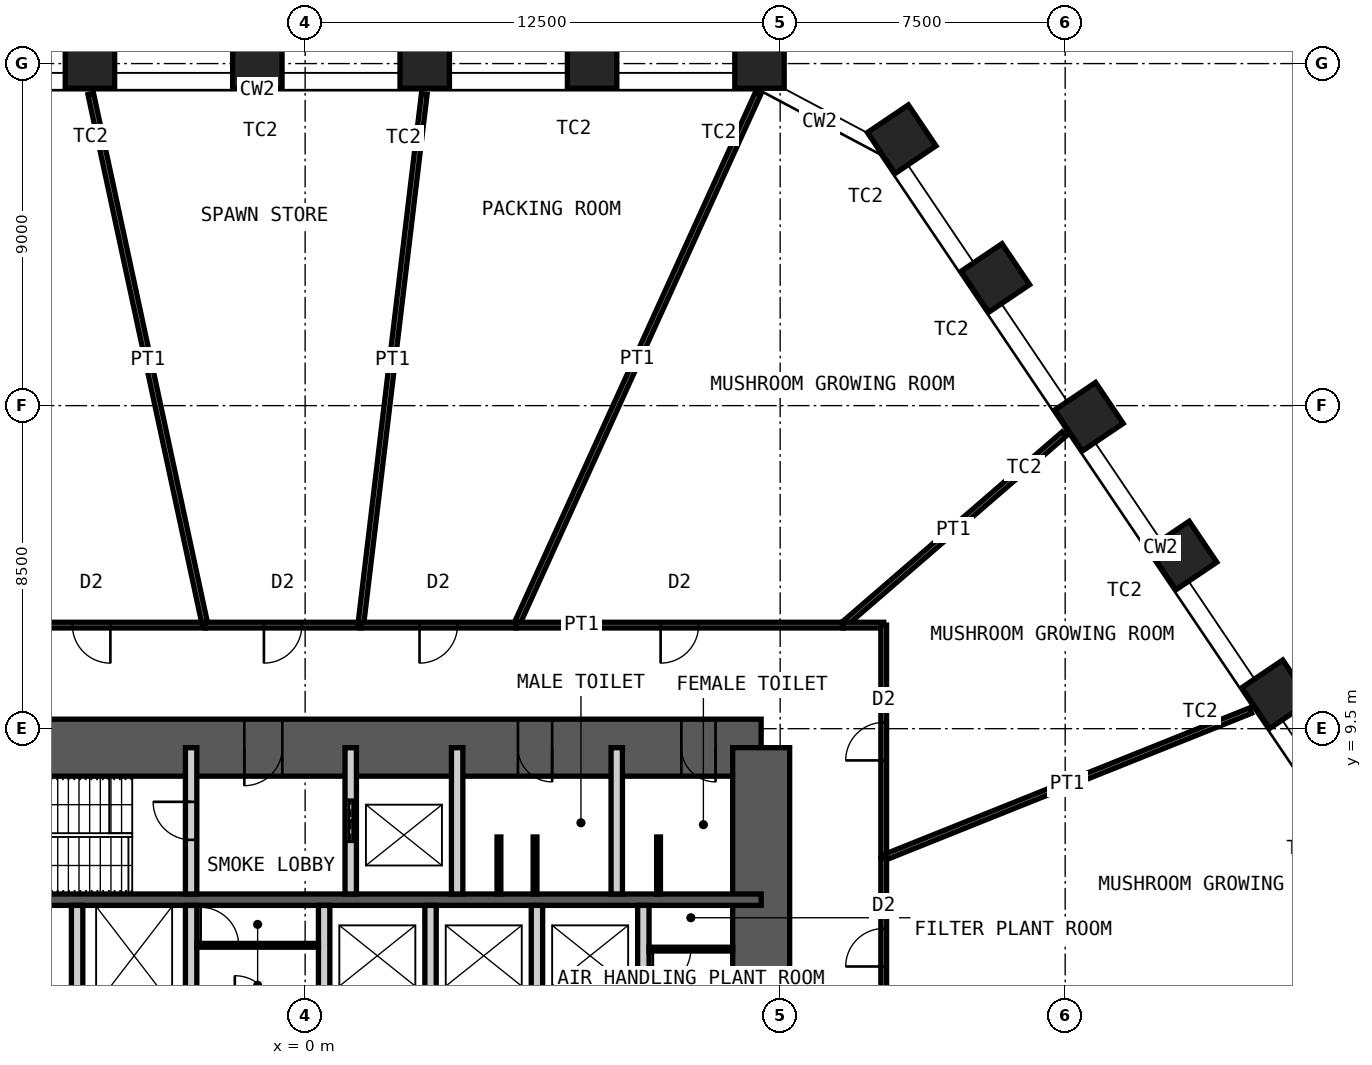
"""IFC4 building model, lengths in metres.
Left out: names, types, materials, properties, quantities, classifications, styles, units other than length and angle.
Written with IfcOpenShell. Run it as: python <this file> out.ifc"""

import sys

from ifc_helpers import new_model, si_unit, direction, frame, frame_2d, origin, origin_2d, place, context, subcontext, project, spatial, rectangle, hollow_rectangle, extrude, element, fill, save


model = new_model("IFC4")
c1 = context("Model", 3, precision=1e-05, world=origin(), true_north=direction((0.0, 1.0)))
c2 = subcontext(c1, "Body", "Model", "MODEL_VIEW")
j1 = project(units=[si_unit("LENGTHUNIT", "METRE"), si_unit("PLANEANGLEUNIT", "RADIAN")], contexts=[c1])
p1 = place(None, origin())
s1 = spatial("IfcSite", under=j1, at=p1, CompositionType="ELEMENT")
p2 = place(p1, origin())
s2 = spatial("IfcBuilding", under=s1, at=p2, CompositionType="ELEMENT")
p3 = place(p2, frame((0.0, 0.0, 67.0)))
s3 = spatial("IfcBuildingStorey", under=s2, at=p3, CompositionType="ELEMENT", Elevation=67.0)
for number, where, z_axis, x_axis in (
    (1, (-5.662, 27.0, 0.0), (0.0, 0.0, 1.0), (-1.0, 0.0, 0.0)),
    (2, (-1.258, 27.0, 0.0), (0.0, 0.0, 1.0), (-1.0, 0.0, 0.0)),
    (3, (3.147, 27.0, 0.0), (0.0, 0.0, 1.0), (-1.0, 0.0, 0.0)),
    (4, (7.552, 27.0, 0.0), (0.0, 0.0, 1.0), (-1.0, 0.0, 0.0)),
    (5, (11.956, 27.0, 0.0), (0.0, 0.0, 1.0), (-1.0, 0.0, 0.0)),
    (6, (15.698, 25.01, 0.0), (0.0, 0.0, 1.0), (-0.559, 0.829, 0.0)),
    (7, (18.161, 21.359, 0.0), (0.0, 0.0, 1.0), (-0.559, 0.829, 0.0)),
    (8, (20.624, 17.707, 0.0), (0.0, 0.0, 1.0), (-0.559, 0.829, 0.0)),
    (9, (23.087, 14.056, 0.0), (0.0, 0.0, 1.0), (-0.559, 0.829, 0.0)),
    (10, (25.55, 10.404, 0.0), (0.0, 0.0, 1.0), (-0.559, 0.829, 0.0)),
):
    element("IfcColumn", number, at=place(p3, frame(where, z_axis=z_axis, x_axis=x_axis)), inside=s3, PredefinedType="COLUMN", context=c2, shape_type="SweptSolid", body=[
        extrude(hollow_rectangle(XDim=1.3, YDim=1.3, WallThickness=0.1, at=origin_2d()), origin(), (0.0, 0.0, 1.0), 5.0),
    ])
p4 = place(p3, frame((-12.0, 9.0, 0.0), z_axis=(0.0, 0.0, 1.0), x_axis=(1.0, 0.0, 0.0)))
e11 = element("IfcWall", 11, at=p4, inside=s3, PredefinedType="SHEAR", context=c2, shape_type="SweptSolid", body=[
    extrude(rectangle(XDim=24.0, YDim=1.5, at=frame_2d((12.0, 0.0))), origin(), (0.0, 0.0, 1.0), 5.0),
])
p5 = place(p4, frame((10.4, 0.0, 0.0)))
e12 = element("IfcOpeningElement", 12, at=p5, cuts=e11, PredefinedType="OPENING", context=c2, shape_type="SweptSolid", body=[
    extrude(rectangle(XDim=1.0, YDim=2.1, at=frame_2d((0.5, 1.05))), frame((0.0, 0.76, 0.0), z_axis=(0.0, -1.0, 0.0), x_axis=(1.0, 0.0, 0.0)), (0.0, 0.0, 1.0), 1.52),
])
p6 = place(p4, frame((17.6, 0.0, 0.0)))
e13 = element("IfcOpeningElement", 13, at=p6, cuts=e11, PredefinedType="OPENING", context=c2, shape_type="SweptSolid", body=[
    extrude(rectangle(XDim=0.9, YDim=2.1, at=frame_2d((0.45, 1.05))), frame((0.0, 0.76, 0.0), z_axis=(0.0, -1.0, 0.0), x_axis=(1.0, 0.0, 0.0)), (0.0, 0.0, 1.0), 1.52),
])
p7 = place(p4, frame((21.9, 0.0, 0.0)))
e14 = element("IfcOpeningElement", 14, at=p7, cuts=e11, PredefinedType="OPENING", context=c2, shape_type="SweptSolid", body=[
    extrude(rectangle(XDim=0.9, YDim=2.1, at=frame_2d((0.45, 1.05))), frame((0.0, 0.76, 0.0), z_axis=(0.0, -1.0, 0.0), x_axis=(1.0, 0.0, 0.0)), (0.0, 0.0, 1.0), 1.52),
])
p8 = place(p3, frame((12.0, -9.0, 0.0), z_axis=(0.0, 0.0, 1.0), x_axis=(0.0, 1.0, 0.0)))
e15 = element("IfcWall", 15, at=p8, inside=s3, PredefinedType="SHEAR", context=c2, shape_type="SweptSolid", body=[
    extrude(rectangle(XDim=18.0, YDim=1.5, at=frame_2d((9.0, 0.0))), origin(), (0.0, 0.0, 1.0), 5.0),
])
p9 = place(p8, frame((8.1, 0.0, 0.0)))
e16 = element("IfcOpeningElement", 16, at=p9, cuts=e15, PredefinedType="OPENING", context=c2, shape_type="SweptSolid", body=[
    extrude(rectangle(XDim=1.8, YDim=2.1, at=frame_2d((0.9, 1.05))), frame((0.0, 0.76, 0.0), z_axis=(0.0, -1.0, 0.0), x_axis=(1.0, 0.0, 0.0)), (0.0, 0.0, 1.0), 1.52),
])
p10 = place(p3, frame((-12.0, 5.0, 0.0), z_axis=(0.0, 0.0, 1.0), x_axis=(1.0, 0.0, 0.0)))
e17 = element("IfcWall", 17, at=p10, inside=s3, PredefinedType="SHEAR", context=c2, shape_type="SweptSolid", body=[
    extrude(rectangle(XDim=24.0, YDim=0.3, at=frame_2d((12.0, 0.0))), origin(), (0.0, 0.0, 1.0), 5.0),
])
p11 = place(p3, frame((-3.0, 5.15, 0.0), z_axis=(0.0, 0.0, 1.0), x_axis=(0.0, 1.0, 0.0)))
e18 = element("IfcWall", 18, at=p11, inside=s3, PredefinedType="PARTITIONING", context=c2, shape_type="SweptSolid", body=[
    extrude(rectangle(XDim=3.85, YDim=0.3, at=frame_2d((1.925, 0.0))), origin(), (0.0, 0.0, 1.0), 4.78),
])
p12 = place(p11, frame((1.425, 0.0, 0.0)))
e19 = element("IfcOpeningElement", 19, at=p12, cuts=e18, PredefinedType="OPENING", context=c2, shape_type="SweptSolid", body=[
    extrude(rectangle(XDim=1.0, YDim=2.1, at=frame_2d((0.5, 1.05))), frame((0.0, 0.16, 0.0), z_axis=(0.0, -1.0, 0.0), x_axis=(1.0, 0.0, 0.0)), (0.0, 0.0, 1.0), 0.32),
])
p13 = place(p3, frame((1.2, 5.15, 0.0), z_axis=(0.0, 0.0, 1.0), x_axis=(0.0, 1.0, 0.0)))
e20 = element("IfcWall", 20, at=p13, inside=s3, PredefinedType="PARTITIONING", context=c2, shape_type="SweptSolid", body=[
    extrude(rectangle(XDim=3.85, YDim=0.3, at=frame_2d((1.925, 0.0))), origin(), (0.0, 0.0, 1.0), 4.78),
])
p14 = place(p13, frame((1.375, 0.0, 0.0)))
e21 = element("IfcOpeningElement", 21, at=p14, cuts=e20, PredefinedType="OPENING", context=c2, shape_type="SweptSolid", body=[
    extrude(rectangle(XDim=1.1, YDim=2.4, at=frame_2d((0.55, 1.2))), frame((0.0, 0.16, 0.0), z_axis=(0.0, -1.0, 0.0), x_axis=(1.0, 0.0, 0.0)), (0.0, 0.0, 1.0), 0.32),
])
for number, where, z_axis, x_axis in (
    (22, (4.0, 5.15, 0.0), (0.0, 0.0, 1.0), (0.0, 1.0, 0.0)),
    (23, (8.2, 5.15, 0.0), (0.0, 0.0, 1.0), (0.0, 1.0, 0.0)),
):
    element("IfcWall", number, at=place(p3, frame(where, z_axis=z_axis, x_axis=x_axis)), inside=s3, PredefinedType="PARTITIONING", context=c2, shape_type="SweptSolid", body=[
        extrude(rectangle(XDim=3.85, YDim=0.3, at=frame_2d((1.925, 0.0))), origin(), (0.0, 0.0, 1.0), 4.78),
    ])
for number, where, z_axis, x_axis in (
    (24, (-6.0, 2.2, 0.0), (0.0, 0.0, 1.0), (0.0, 1.0, 0.0)),
    (25, (-3.0, 2.2, 0.0), (0.0, 0.0, 1.0), (0.0, 1.0, 0.0)),
    (26, (0.5, 2.2, 0.0), (0.0, 0.0, 1.0), (0.0, 1.0, 0.0)),
    (27, (3.3, 2.2, 0.0), (0.0, 0.0, 1.0), (0.0, 1.0, 0.0)),
    (28, (6.1, 2.2, 0.0), (0.0, 0.0, 1.0), (0.0, 1.0, 0.0)),
    (29, (8.9, 2.2, 0.0), (0.0, 0.0, 1.0), (0.0, 1.0, 0.0)),
):
    element("IfcWall", number, at=place(p3, frame(where, z_axis=z_axis, x_axis=x_axis)), inside=s3, PredefinedType="PARTITIONING", context=c2, shape_type="SweptSolid", body=[
        extrude(rectangle(XDim=2.65, YDim=0.3, at=frame_2d((1.325, 0.0))), origin(), (0.0, 0.0, 1.0), 4.78),
    ])
p15 = place(p3, frame((-2.85, 3.8, 0.0), z_axis=(0.0, 0.0, 1.0), x_axis=(1.0, 0.0, 0.0)))
e30 = element("IfcWall", 30, at=p15, inside=s3, PredefinedType="PARTITIONING", context=c2, shape_type="SweptSolid", body=[
    extrude(rectangle(XDim=3.2, YDim=0.1, at=frame_2d((1.6, 0.0))), origin(), (0.0, 0.0, 1.0), 4.78),
])
p16 = place(p15, frame((0.1, 0.0, 0.0)))
e31 = element("IfcOpeningElement", 31, at=p16, cuts=e30, PredefinedType="OPENING", context=c2, shape_type="SweptSolid", body=[
    extrude(rectangle(XDim=1.0, YDim=2.4, at=frame_2d((0.5, 1.2))), frame((0.0, 0.06, 0.0), z_axis=(0.0, -1.0, 0.0), x_axis=(1.0, 0.0, 0.0)), (0.0, 0.0, 1.0), 0.12),
])
p17 = place(p3, frame((9.05, 3.7, 0.0), z_axis=(0.0, 0.0, 1.0), x_axis=(1.0, 0.0, 0.0)))
e32 = element("IfcWall", 32, at=p17, inside=s3, PredefinedType="PARTITIONING", context=c2, shape_type="SweptSolid", body=[
    extrude(rectangle(XDim=2.2, YDim=0.1, at=frame_2d((1.1, 0.0))), origin(), (0.0, 0.0, 1.0), 4.78),
])
p18 = place(p17, frame((0.1, 0.0, 0.0)))
e33 = element("IfcOpeningElement", 33, at=p18, cuts=e32, PredefinedType="OPENING", context=c2, shape_type="SweptSolid", body=[
    extrude(rectangle(XDim=1.0, YDim=2.4, at=frame_2d((0.5, 1.2))), frame((0.0, 0.06, 0.0), z_axis=(0.0, -1.0, 0.0), x_axis=(1.0, 0.0, 0.0)), (0.0, 0.0, 1.0), 0.12),
])
for number, where, z_axis, x_axis in (
    (34, (5.1, 5.15, 0.0), (0.0, 0.0, 1.0), (0.0, 1.0, 0.0)),
    (35, (6.05, 5.15, 0.0), (0.0, 0.0, 1.0), (0.0, 1.0, 0.0)),
    (36, (9.3, 5.15, 0.0), (0.0, 0.0, 1.0), (0.0, 1.0, 0.0)),
):
    element("IfcWall", number, at=place(p3, frame(where, z_axis=z_axis, x_axis=x_axis)), inside=s3, PredefinedType="PARTITIONING", context=c2, shape_type="SweptSolid", body=[
        extrude(rectangle(XDim=1.5, YDim=0.1, at=frame_2d((0.75, 0.0))), origin(), (0.0, 0.0, 1.0), 2.1),
    ])
p19 = place(p3, frame((11.915, 26.209, 0.0), z_axis=(0.0, 0.0, 1.0), x_axis=(-0.413849644385, -0.910345248707, 0.0)))
e37 = element("IfcWall", 37, at=p19, inside=s3, PredefinedType="PARTITIONING", context=c2, shape_type="SweptSolid", body=[
    extrude(rectangle(XDim=15.361, YDim=0.15, at=frame_2d((7.681, 0.0))), origin(), (0.0, 0.0, 1.0), 3.7),
])
p20 = place(p3, frame((5.558, 12.225, 0.0), z_axis=(0.0, 0.0, 1.0), x_axis=(1.0, 0.0, 0.0)))
e38 = element("IfcWall", 38, at=p20, inside=s3, PredefinedType="PARTITIONING", context=c2, shape_type="SweptSolid", body=[
    extrude(rectangle(XDim=8.594, YDim=0.15, at=frame_2d((4.297, 0.0))), origin(), (0.0, 0.0, 1.0), 4.8),
])
p21 = place(p20, frame((3.797, 0.0, 0.0)))
e39 = element("IfcOpeningElement", 39, at=p21, cuts=e38, PredefinedType="OPENING", context=c2, shape_type="SweptSolid", body=[
    extrude(rectangle(XDim=1.0, YDim=2.4, at=frame_2d((0.5, 1.2))), frame((0.0, 0.085, 0.0), z_axis=(0.0, -1.0, 0.0), x_axis=(1.0, 0.0, 0.0)), (0.0, 0.0, 1.0), 0.17),
])
p22 = place(p3, frame((19.968, 17.25, 0.0), z_axis=(0.0, 0.0, 1.0), x_axis=(-0.756742305634, -0.653713303264, 0.0)))
e40 = element("IfcWall", 40, at=p22, inside=s3, PredefinedType="PARTITIONING", context=c2, shape_type="SweptSolid", body=[
    extrude(rectangle(XDim=7.687, YDim=0.15, at=frame_2d((3.844, 0.0))), origin(), (0.0, 0.0, 1.0), 3.7),
])
p23 = place(p3, frame((14.151, 12.225, 0.0), z_axis=(0.0, 0.0, 1.0), x_axis=(1.0, 0.0, 0.0)))
e41 = element("IfcWall", 41, at=p23, inside=s3, PredefinedType="PARTITIONING", context=c2, shape_type="SweptSolid", body=[
    extrude(rectangle(XDim=1.074, YDim=0.15, at=frame_2d((0.537, 0.0))), origin(), (0.0, 0.0, 1.0), 4.8),
])
p24 = place(p3, frame((15.225, 12.225, 0.0), z_axis=(0.0, 0.0, 1.0), x_axis=(0.0, -1.0, 0.0)))
e42 = element("IfcWall", 42, at=p24, inside=s3, PredefinedType="PARTITIONING", context=c2, shape_type="SweptSolid", body=[
    extrude(rectangle(XDim=6.12, YDim=0.15, at=frame_2d((3.06, 0.0))), origin(), (0.0, 0.0, 1.0), 4.8),
])
p25 = place(p24, frame((2.56, 0.0, 0.0)))
e43 = element("IfcOpeningElement", 43, at=p25, cuts=e42, PredefinedType="OPENING", context=c2, shape_type="SweptSolid", body=[
    extrude(rectangle(XDim=1.0, YDim=2.4, at=frame_2d((0.5, 1.2))), frame((0.0, 0.085, 0.0), z_axis=(0.0, -1.0, 0.0), x_axis=(1.0, 0.0, 0.0)), (0.0, 0.0, 1.0), 0.17),
])
p26 = place(p3, frame((24.877, 9.975, 0.0), z_axis=(0.0, 0.0, 1.0), x_axis=(-0.928160631083, -0.372179852904, 0.0)))
e44 = element("IfcWall", 44, at=p26, inside=s3, PredefinedType="PARTITIONING", context=c2, shape_type="SweptSolid", body=[
    extrude(rectangle(XDim=10.399, YDim=0.15, at=frame_2d((5.2, 0.0))), origin(), (0.0, 0.0, 1.0), 3.7),
])
p27 = place(p3, frame((15.225, 6.105, 0.0), z_axis=(0.0, 0.0, 1.0), x_axis=(0.0, -1.0, 0.0)))
e45 = element("IfcWall", 45, at=p27, inside=s3, PredefinedType="PARTITIONING", context=c2, shape_type="SweptSolid", body=[
    extrude(rectangle(XDim=4.725, YDim=0.15, at=frame_2d((2.363, 0.0))), origin(), (0.0, 0.0, 1.0), 4.8),
])
p28 = place(p27, frame((1.863, 0.0, 0.0)))
e46 = element("IfcOpeningElement", 46, at=p28, cuts=e45, PredefinedType="OPENING", context=c2, shape_type="SweptSolid", body=[
    extrude(rectangle(XDim=1.0, YDim=2.4, at=frame_2d((0.5, 1.2))), frame((0.0, 0.085, 0.0), z_axis=(0.0, -1.0, 0.0), x_axis=(1.0, 0.0, 0.0)), (0.0, 0.0, 1.0), 0.17),
])
p29 = place(p3, frame((29.796, 2.7, 0.0), z_axis=(0.0, 0.0, 1.0), x_axis=(-0.995918470907, -0.090257405823, 0.0)))
e47 = element("IfcWall", 47, at=p29, inside=s3, PredefinedType="PARTITIONING", context=c2, shape_type="SweptSolid", body=[
    extrude(rectangle(XDim=14.631, YDim=0.15, at=frame_2d((7.315, 0.0))), origin(), (0.0, 0.0, 1.0), 3.7),
])
p30 = place(p3, frame((-8.617, 12.225, 0.0), z_axis=(0.0, 0.0, 1.0), x_axis=(1.0, 0.0, 0.0)))
e48 = element("IfcWall", 48, at=p30, inside=s3, PredefinedType="PARTITIONING", context=c2, shape_type="SweptSolid", body=[
    extrude(rectangle(XDim=5.985, YDim=0.15, at=frame_2d((2.992, 0.0))), origin(), (0.0, 0.0, 1.0), 4.8),
])
p31 = place(p30, frame((2.492, 0.0, 0.0)))
e49 = element("IfcOpeningElement", 49, at=p31, cuts=e48, PredefinedType="OPENING", context=c2, shape_type="SweptSolid", body=[
    extrude(rectangle(XDim=1.0, YDim=2.4, at=frame_2d((0.5, 1.2))), frame((0.0, 0.085, 0.0), z_axis=(0.0, -1.0, 0.0), x_axis=(1.0, 0.0, 0.0)), (0.0, 0.0, 1.0), 0.17),
])
p32 = place(p3, frame((-5.641, 26.202, 0.0), z_axis=(0.0, 0.0, 1.0), x_axis=(0.21046192705, -0.977602054653, 0.0)))
e50 = element("IfcWall", 50, at=p32, inside=s3, PredefinedType="PARTITIONING", context=c2, shape_type="SweptSolid", body=[
    extrude(rectangle(XDim=14.297, YDim=0.15, at=frame_2d((7.149, 0.0))), origin(), (0.0, 0.0, 1.0), 3.7),
])
p33 = place(p3, frame((-2.632, 12.225, 0.0), z_axis=(0.0, 0.0, 1.0), x_axis=(1.0, 0.0, 0.0)))
e51 = element("IfcWall", 51, at=p33, inside=s3, PredefinedType="PARTITIONING", context=c2, shape_type="SweptSolid", body=[
    extrude(rectangle(XDim=4.095, YDim=0.15, at=frame_2d((2.047, 0.0))), origin(), (0.0, 0.0, 1.0), 4.8),
])
p34 = place(p33, frame((1.547, 0.0, 0.0)))
e52 = element("IfcOpeningElement", 52, at=p34, cuts=e51, PredefinedType="OPENING", context=c2, shape_type="SweptSolid", body=[
    extrude(rectangle(XDim=1.0, YDim=2.4, at=frame_2d((0.5, 1.2))), frame((0.0, 0.085, 0.0), z_axis=(0.0, -1.0, 0.0), x_axis=(1.0, 0.0, 0.0)), (0.0, 0.0, 1.0), 0.17),
])
p35 = place(p3, frame((3.135, 26.201, 0.0), z_axis=(0.0, 0.0, 1.0), x_axis=(-0.118798442734, -0.992918390405, 0.0)))
e53 = element("IfcWall", 53, at=p35, inside=s3, PredefinedType="PARTITIONING", context=c2, shape_type="SweptSolid", body=[
    extrude(rectangle(XDim=14.075, YDim=0.15, at=frame_2d((7.038, 0.0))), origin(), (0.0, 0.0, 1.0), 3.7),
])
p36 = place(p3, frame((1.463, 12.225, 0.0), z_axis=(0.0, 0.0, 1.0), x_axis=(1.0, 0.0, 0.0)))
e54 = element("IfcWall", 54, at=p36, inside=s3, PredefinedType="PARTITIONING", context=c2, shape_type="SweptSolid", body=[
    extrude(rectangle(XDim=4.095, YDim=0.15, at=frame_2d((2.047, 0.0))), origin(), (0.0, 0.0, 1.0), 4.8),
])
p37 = place(p36, frame((1.547, 0.0, 0.0)))
e55 = element("IfcOpeningElement", 55, at=p37, cuts=e54, PredefinedType="OPENING", context=c2, shape_type="SweptSolid", body=[
    extrude(rectangle(XDim=1.0, YDim=2.4, at=frame_2d((0.5, 1.2))), frame((0.0, 0.085, 0.0), z_axis=(0.0, -1.0, 0.0), x_axis=(1.0, 0.0, 0.0)), (0.0, 0.0, 1.0), 0.17),
])
p38 = place(p5, origin())
e56 = element("IfcDoor", 56, at=p38, inside=s3, OperationType="SINGLE_SWING_LEFT", PredefinedType="DOOR", context=c2, shape_type="SweptSolid", body=[
    extrude(rectangle(XDim=1.0, YDim=2.1, at=frame_2d((0.5, 1.05))), frame((0.0, 0.025, 0.0), z_axis=(0.0, -1.0, 0.0), x_axis=(1.0, 0.0, 0.0)), (0.0, 0.0, 1.0), 0.05),
])
fill(e12, e56)
p39 = place(p6, origin())
e57 = element("IfcDoor", 57, at=p39, inside=s3, OperationType="SINGLE_SWING_RIGHT", PredefinedType="DOOR", context=c2, shape_type="SweptSolid", body=[
    extrude(rectangle(XDim=0.9, YDim=2.1, at=frame_2d((0.45, 1.05))), frame((0.0, 0.025, 0.0), z_axis=(0.0, -1.0, 0.0), x_axis=(1.0, 0.0, 0.0)), (0.0, 0.0, 1.0), 0.05),
])
fill(e13, e57)
p40 = place(p7, origin())
e58 = element("IfcDoor", 58, at=p40, inside=s3, OperationType="SINGLE_SWING_RIGHT", PredefinedType="DOOR", context=c2, shape_type="SweptSolid", body=[
    extrude(rectangle(XDim=0.9, YDim=2.1, at=frame_2d((0.45, 1.05))), frame((0.0, 0.025, 0.0), z_axis=(0.0, -1.0, 0.0), x_axis=(1.0, 0.0, 0.0)), (0.0, 0.0, 1.0), 0.05),
])
fill(e14, e58)
p41 = place(p12, origin())
e59 = element("IfcDoor", 59, at=p41, inside=s3, OperationType="SINGLE_SWING_LEFT", PredefinedType="DOOR", context=c2, shape_type="SweptSolid", body=[
    extrude(rectangle(XDim=1.0, YDim=2.1, at=frame_2d((0.5, 1.05))), frame((0.0, 0.025, 0.0), z_axis=(0.0, -1.0, 0.0), x_axis=(1.0, 0.0, 0.0)), (0.0, 0.0, 1.0), 0.05),
])
fill(e19, e59)
p42 = place(p14, origin())
e60 = element("IfcDoor", 60, at=p42, inside=s3, OperationType="DOUBLE_DOOR_SLIDING", PredefinedType="DOOR", context=c2, shape_type="SweptSolid", body=[
    extrude(rectangle(XDim=1.1, YDim=2.4, at=frame_2d((0.55, 1.2))), frame((0.0, 0.025, 0.0), z_axis=(0.0, -1.0, 0.0), x_axis=(1.0, 0.0, 0.0)), (0.0, 0.0, 1.0), 0.05),
])
fill(e21, e60)
p43 = place(p16, origin())
e61 = element("IfcDoor", 61, at=p43, inside=s3, OperationType="SINGLE_SWING_RIGHT", PredefinedType="DOOR", context=c2, shape_type="SweptSolid", body=[
    extrude(rectangle(XDim=1.0, YDim=2.4, at=frame_2d((0.5, 1.2))), frame((0.0, 0.025, 0.0), z_axis=(0.0, -1.0, 0.0), x_axis=(1.0, 0.0, 0.0)), (0.0, 0.0, 1.0), 0.05),
])
fill(e31, e61)
p44 = place(p18, origin())
e62 = element("IfcDoor", 62, at=p44, inside=s3, OperationType="SINGLE_SWING_LEFT", PredefinedType="DOOR", context=c2, shape_type="SweptSolid", body=[
    extrude(rectangle(XDim=1.0, YDim=2.4, at=frame_2d((0.5, 1.2))), frame((0.0, 0.025, 0.0), z_axis=(0.0, -1.0, 0.0), x_axis=(1.0, 0.0, 0.0)), (0.0, 0.0, 1.0), 0.05),
])
fill(e33, e62)
p45 = place(p21, origin())
e63 = element("IfcDoor", 63, at=p45, inside=s3, OperationType="SINGLE_SWING_LEFT", PredefinedType="DOOR", context=c2, shape_type="SweptSolid", body=[
    extrude(rectangle(XDim=1.0, YDim=2.4, at=frame_2d((0.5, 1.2))), frame((0.0, 0.025, 0.0), z_axis=(0.0, -1.0, 0.0), x_axis=(1.0, 0.0, 0.0)), (0.0, 0.0, 1.0), 0.05),
])
fill(e39, e63)
p46 = place(p25, origin())
e64 = element("IfcDoor", 64, at=p46, inside=s3, OperationType="SINGLE_SWING_RIGHT", PredefinedType="DOOR", context=c2, shape_type="SweptSolid", body=[
    extrude(rectangle(XDim=1.0, YDim=2.4, at=frame_2d((0.5, 1.2))), frame((0.0, 0.025, 0.0), z_axis=(0.0, -1.0, 0.0), x_axis=(1.0, 0.0, 0.0)), (0.0, 0.0, 1.0), 0.05),
])
fill(e43, e64)
p47 = place(p28, origin())
e65 = element("IfcDoor", 65, at=p47, inside=s3, OperationType="SINGLE_SWING_RIGHT", PredefinedType="DOOR", context=c2, shape_type="SweptSolid", body=[
    extrude(rectangle(XDim=1.0, YDim=2.4, at=frame_2d((0.5, 1.2))), frame((0.0, 0.025, 0.0), z_axis=(0.0, -1.0, 0.0), x_axis=(1.0, 0.0, 0.0)), (0.0, 0.0, 1.0), 0.05),
])
fill(e46, e65)
p48 = place(p31, origin())
e66 = element("IfcDoor", 66, at=p48, inside=s3, OperationType="SINGLE_SWING_RIGHT", PredefinedType="DOOR", context=c2, shape_type="SweptSolid", body=[
    extrude(rectangle(XDim=1.0, YDim=2.4, at=frame_2d((0.5, 1.2))), frame((0.0, 0.025, 0.0), z_axis=(0.0, -1.0, 0.0), x_axis=(1.0, 0.0, 0.0)), (0.0, 0.0, 1.0), 0.05),
])
fill(e49, e66)
p49 = place(p34, origin())
e67 = element("IfcDoor", 67, at=p49, inside=s3, OperationType="SINGLE_SWING_LEFT", PredefinedType="DOOR", context=c2, shape_type="SweptSolid", body=[
    extrude(rectangle(XDim=1.0, YDim=2.4, at=frame_2d((0.5, 1.2))), frame((0.0, 0.025, 0.0), z_axis=(0.0, -1.0, 0.0), x_axis=(1.0, 0.0, 0.0)), (0.0, 0.0, 1.0), 0.05),
])
fill(e52, e67)
p50 = place(p37, origin())
e68 = element("IfcDoor", 68, at=p50, inside=s3, OperationType="SINGLE_SWING_LEFT", PredefinedType="DOOR", context=c2, shape_type="SweptSolid", body=[
    extrude(rectangle(XDim=1.0, YDim=2.4, at=frame_2d((0.5, 1.2))), frame((0.0, 0.025, 0.0), z_axis=(0.0, -1.0, 0.0), x_axis=(1.0, 0.0, 0.0)), (0.0, 0.0, 1.0), 0.05),
])
fill(e55, e68)
save(model, sys.argv[1])
